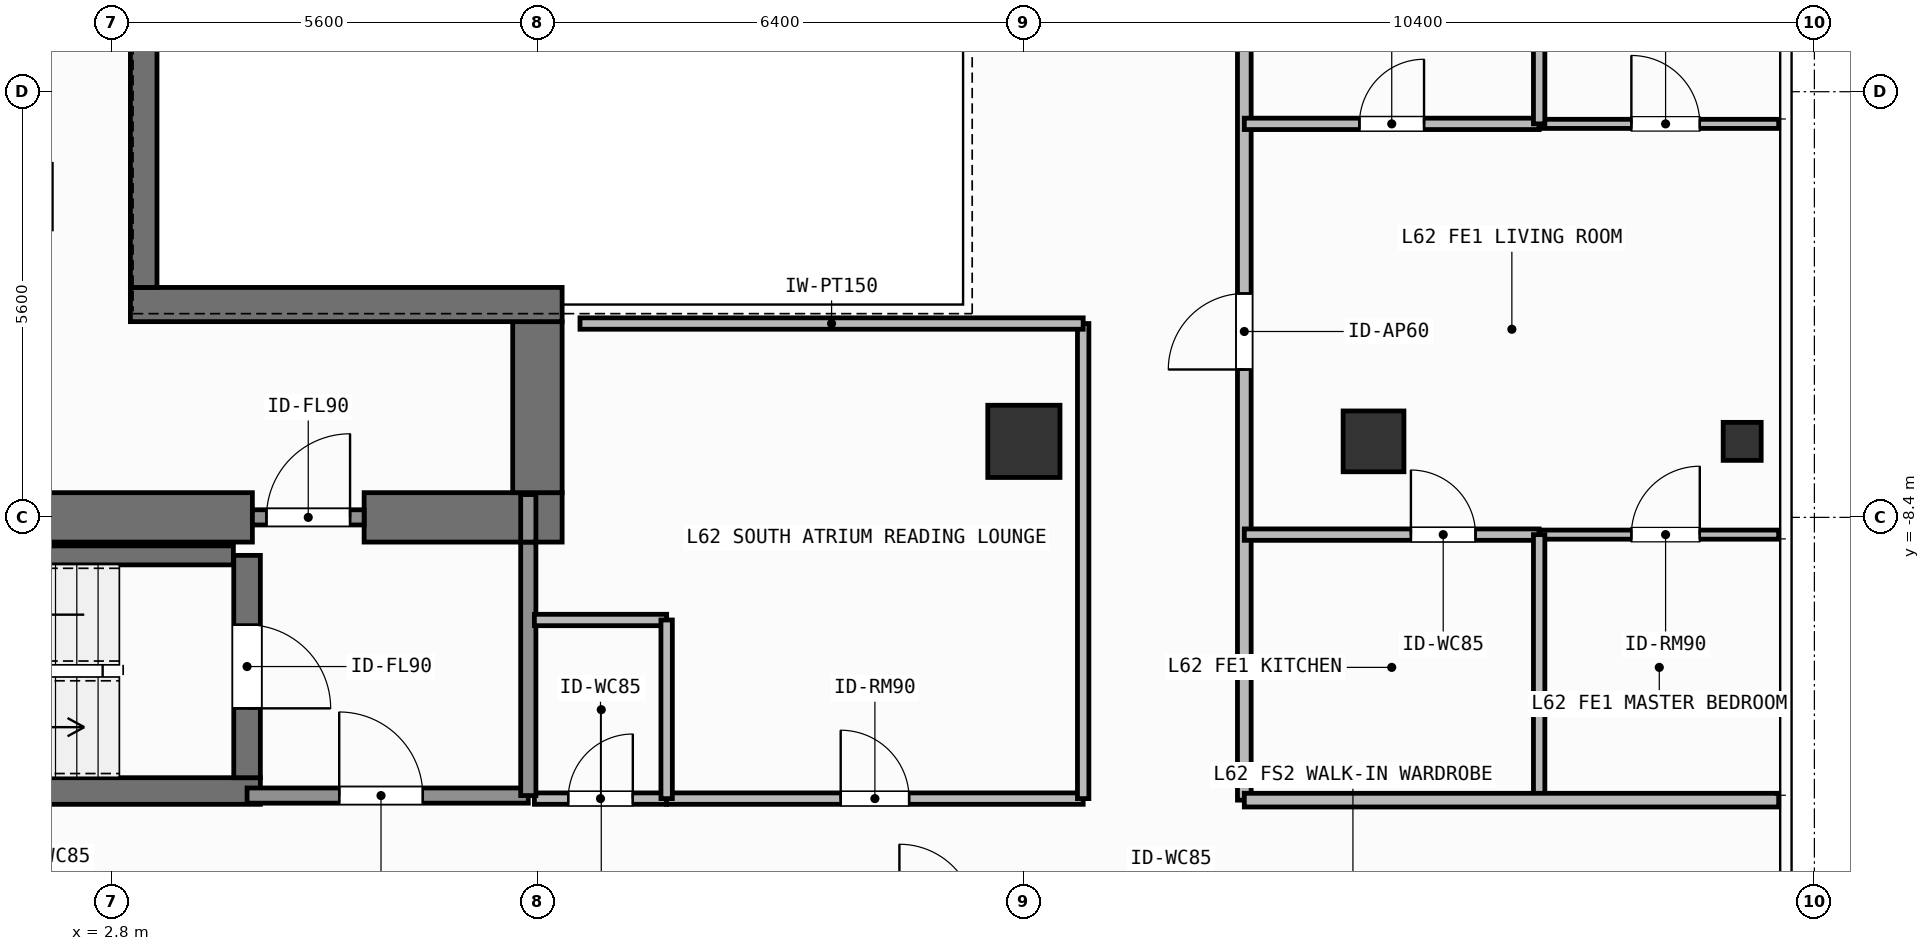
"""IFC4 building model, lengths in metres.
Left out: names, types, materials, properties, quantities, classifications, styles, units other than length and angle.
Written with IfcOpenShell. Run it as: python <this file> out.ifc"""

import sys

from ifc_helpers import new_model, si_unit, direction, frame, frame_2d, origin, origin_2d, place, context, subcontext, project, spatial, rectangle, hollow_rectangle, extrude, element, fill, save


model = new_model("IFC4")
c1 = context("Model", 3, precision=1e-05, world=origin(), true_north=direction((0.0, 1.0)))
c2 = subcontext(c1, "Body", "Model", "MODEL_VIEW")
j1 = project(units=[si_unit("LENGTHUNIT", "METRE"), si_unit("PLANEANGLEUNIT", "RADIAN")], contexts=[c1])
p1 = place(None, origin())
s1 = spatial("IfcSite", under=j1, at=p1, CompositionType="ELEMENT")
p2 = place(p1, origin())
s2 = spatial("IfcBuilding", under=s1, at=p2, CompositionType="ELEMENT")
p3 = place(p2, frame((0.0, 0.0, 254.7)))
s3 = spatial("IfcBuildingStorey", under=s2, at=p3, CompositionType="ELEMENT", Elevation=254.7)
p4 = place(p3, frame((-2.62, -8.4, 0.0), z_axis=(0.0, 0.0, 1.0), x_axis=(1.0, 0.0, 0.0)))
e1 = element("IfcWall", 1, at=p4, inside=s3, PredefinedType="SHEAR", context=c2, shape_type="SweptSolid", body=[
    extrude(rectangle(XDim=7.27, YDim=0.65, at=frame_2d((3.635, 0.0))), origin(), (0.0, 0.0, 1.0), 3.9),
])
p5 = place(p3, frame((6.12, -8.4, 0.0), z_axis=(0.0, 0.0, 1.0), x_axis=(1.0, 0.0, 0.0)))
e2 = element("IfcWall", 2, at=p5, inside=s3, PredefinedType="SHEAR", context=c2, shape_type="SweptSolid", body=[
    extrude(rectangle(XDim=2.605, YDim=0.65, at=frame_2d((1.302, 0.0))), origin(), (0.0, 0.0, 1.0), 3.9),
])
p6 = place(p3, frame((8.4, -8.075, 0.0), z_axis=(0.0, 0.0, 1.0), x_axis=(0.0, 1.0, 0.0)))
e3 = element("IfcWall", 3, at=p6, inside=s3, PredefinedType="SHEAR", context=c2, shape_type="SweptSolid", body=[
    extrude(rectangle(XDim=2.25, YDim=0.65, at=frame_2d((1.125, 0.0))), origin(), (0.0, 0.0, 1.0), 3.9),
])
p7 = place(p3, frame((3.045, -5.6, 0.0), z_axis=(0.0, 0.0, 1.0), x_axis=(1.0, 0.0, 0.0)))
e4 = element("IfcWall", 4, at=p7, inside=s3, PredefinedType="SHEAR", context=c2, shape_type="SweptSolid", body=[
    extrude(rectangle(XDim=5.68, YDim=0.45, at=frame_2d((2.84, 0.0))), origin(), (0.0, 0.0, 1.0), 3.9),
])
p8 = place(p3, frame((3.22, -5.375, 0.0), z_axis=(0.0, 0.0, 1.0), x_axis=(0.0, 1.0, 0.0)))
e5 = element("IfcWall", 5, at=p8, inside=s3, PredefinedType="SHEAR", context=c2, shape_type="SweptSolid", body=[
    extrude(rectangle(XDim=10.75, YDim=0.35, at=frame_2d((5.375, 0.0))), origin(), (0.0, 0.0, 1.0), 3.9),
])
p9 = place(p3, frame((-2.555, -12.0, 0.0), z_axis=(0.0, 0.0, 1.0), x_axis=(1.0, 0.0, 0.0)))
e6 = element("IfcWall", 6, at=p9, inside=s3, PredefinedType="SHEAR", context=c2, shape_type="SweptSolid", body=[
    extrude(rectangle(XDim=7.31, YDim=0.35, at=frame_2d((3.655, 0.0))), origin(), (0.0, 0.0, 1.0), 3.9),
])
p10 = place(p3, frame((-2.2, -8.9, 0.0), z_axis=(0.0, 0.0, 1.0), x_axis=(1.0, 0.0, 0.0)))
e7 = element("IfcWall", 7, at=p10, inside=s3, PredefinedType="SHEAR", context=c2, shape_type="SweptSolid", body=[
    extrude(rectangle(XDim=6.6, YDim=0.25, at=frame_2d((3.3, 0.0))), origin(), (0.0, 0.0, 1.0), 3.9),
])
p11 = place(p3, frame((4.58, -8.9, 0.0), z_axis=(0.0, 0.0, 1.0), x_axis=(0.0, -1.0, 0.0)))
e8 = element("IfcWall", 8, at=p11, inside=s3, PredefinedType="SHEAR", context=c2, shape_type="SweptSolid", body=[
    extrude(rectangle(XDim=2.925, YDim=0.35, at=frame_2d((1.462, 0.0))), origin(), (0.0, 0.0, 1.0), 3.9),
])
p12 = place(p11, frame((0.913, 0.0, 0.0)))
e9 = element("IfcOpeningElement", 9, at=p12, cuts=e8, PredefinedType="OPENING", context=c2, shape_type="SweptSolid", body=[
    extrude(rectangle(XDim=1.1, YDim=2.15, at=frame_2d((0.55, 1.075))), frame((0.0, 0.185, 0.0), z_axis=(0.0, -1.0, 0.0), x_axis=(1.0, 0.0, 0.0)), (0.0, 0.0, 1.0), 0.37),
])
p13 = place(p3, frame((14.8, -7.4, 0.0), z_axis=(0.0, 0.0, 1.0), x_axis=(1.0, 0.0, 0.0)))
e10 = element("IfcColumn", 10, at=p13, inside=s3, PredefinedType="COLUMN", context=c2, shape_type="SweptSolid", body=[
    extrude(rectangle(XDim=0.95, YDim=0.95, at=origin_2d()), origin(), (0.0, 0.0, 1.0), 3.9),
])
p14 = place(p3, frame((19.4, -7.4, 0.0), z_axis=(0.0, 0.0, 1.0), x_axis=(1.0, 0.0, 0.0)))
e11 = element("IfcColumn", 11, at=p14, inside=s3, PredefinedType="COLUMN", context=c2, shape_type="SweptSolid", body=[
    extrude(hollow_rectangle(XDim=0.8, YDim=0.8, WallThickness=0.036, at=origin_2d()), origin(), (0.0, 0.0, 1.0), 3.9),
])
p15 = place(p3, frame((24.25, -7.4, 0.0), z_axis=(0.0, 0.0, 1.0), x_axis=(1.0, 0.0, 0.0)))
e12 = element("IfcColumn", 12, at=p15, inside=s3, PredefinedType="COLUMN", context=c2, shape_type="SweptSolid", body=[
    extrude(hollow_rectangle(XDim=0.5, YDim=0.5, WallThickness=0.025, at=origin_2d()), origin(), (0.0, 0.0, 1.0), 3.9),
])
p16 = place(p3, frame((4.58, -12.06, 0.0), z_axis=(0.0, 0.0, 1.0), x_axis=(1.0, 0.0, 0.0)))
e13 = element("IfcWall", 13, at=p16, inside=s3, PredefinedType="SOLIDWALL", context=c2, shape_type="SweptSolid", body=[
    extrude(rectangle(XDim=3.7, YDim=0.2, at=frame_2d((1.85, 0.0))), origin(), (0.0, 0.0, 1.0), 3.68),
])
p17 = place(p16, frame((1.212, 0.0, 0.0)))
e14 = element("IfcOpeningElement", 14, at=p17, cuts=e13, PredefinedType="OPENING", context=c2, shape_type="SweptSolid", body=[
    extrude(rectangle(XDim=1.1, YDim=2.15, at=frame_2d((0.55, 1.075))), frame((0.0, 0.11, 0.0), z_axis=(0.0, -1.0, 0.0), x_axis=(1.0, 0.0, 0.0)), (0.0, 0.0, 1.0), 0.22),
])
p18 = place(p3, frame((4.65, -8.4, 0.0), z_axis=(0.0, 0.0, 1.0), x_axis=(1.0, 0.0, 0.0)))
e15 = element("IfcWall", 15, at=p18, inside=s3, PredefinedType="SOLIDWALL", context=c2, shape_type="SweptSolid", body=[
    extrude(rectangle(XDim=1.47, YDim=0.2, at=frame_2d((0.735, 0.0))), origin(), (0.0, 0.0, 1.0), 2.92),
])
p19 = place(p18, frame((0.185, 0.0, 0.0)))
e16 = element("IfcOpeningElement", 16, at=p19, cuts=e15, PredefinedType="OPENING", context=c2, shape_type="SweptSolid", body=[
    extrude(rectangle(XDim=1.1, YDim=2.15, at=frame_2d((0.55, 1.075))), frame((0.0, 0.11, 0.0), z_axis=(0.0, -1.0, 0.0), x_axis=(1.0, 0.0, 0.0)), (0.0, 0.0, 1.0), 0.22),
])
p20 = place(p3, frame((8.36, -12.1, 0.0), z_axis=(0.0, 0.0, 1.0), x_axis=(1.0, 0.0, 0.0)))
e17 = element("IfcWall", 17, at=p20, inside=s3, PredefinedType="PARTITIONING", context=c2, shape_type="SweptSolid", body=[
    extrude(rectangle(XDim=1.74, YDim=0.15, at=frame_2d((0.87, 0.0))), origin(), (0.0, 0.0, 1.0), 3.68),
])
p21 = place(p20, frame((0.445, 0.0, 0.0)))
e18 = element("IfcOpeningElement", 18, at=p21, cuts=e17, PredefinedType="OPENING", context=c2, shape_type="SweptSolid", body=[
    extrude(rectangle(XDim=0.85, YDim=2.1, at=frame_2d((0.425, 1.05))), frame((0.0, 0.085, 0.0), z_axis=(0.0, -1.0, 0.0), x_axis=(1.0, 0.0, 0.0)), (0.0, 0.0, 1.0), 0.17),
])
p22 = place(p3, frame((10.1, -12.1, 0.0), z_axis=(0.0, 0.0, 1.0), x_axis=(1.0, 0.0, 0.0)))
e19 = element("IfcWall", 19, at=p22, inside=s3, PredefinedType="PARTITIONING", context=c2, shape_type="SweptSolid", body=[
    extrude(rectangle(XDim=5.48, YDim=0.15, at=frame_2d((2.74, 0.0))), origin(), (0.0, 0.0, 1.0), 3.68),
])
p23 = place(p22, frame((2.29, 0.0, 0.0)))
e20 = element("IfcOpeningElement", 20, at=p23, cuts=e19, PredefinedType="OPENING", context=c2, shape_type="SweptSolid", body=[
    extrude(rectangle(XDim=0.9, YDim=2.1, at=frame_2d((0.45, 1.05))), frame((0.0, 0.085, 0.0), z_axis=(0.0, -1.0, 0.0), x_axis=(1.0, 0.0, 0.0)), (0.0, 0.0, 1.0), 0.17),
])
p24 = place(p3, frame((17.7, -12.12, 0.0), z_axis=(0.0, 0.0, 1.0), x_axis=(0.0, 1.0, 0.0)))
e21 = element("IfcWall", 21, at=p24, inside=s3, PredefinedType="PARTITIONING", context=c2, shape_type="SweptSolid", body=[
    extrude(rectangle(XDim=13.574, YDim=0.18, at=frame_2d((6.787, 0.0))), origin(), (0.0, 0.0, 1.0), 3.68),
])
p25 = place(p24, frame((5.665, 0.0, 0.0)))
e22 = element("IfcOpeningElement", 22, at=p25, cuts=e21, PredefinedType="OPENING", context=c2, shape_type="SweptSolid", body=[
    extrude(rectangle(XDim=1.0, YDim=2.2, at=frame_2d((0.5, 1.1))), frame((0.0, 0.1, 0.0), z_axis=(0.0, -1.0, 0.0), x_axis=(1.0, 0.0, 0.0)), (0.0, 0.0, 1.0), 0.2),
])
p26 = place(p3, frame((17.7, -3.223, 0.0), z_axis=(0.0, 0.0, 1.0), x_axis=(1.0, 0.0, 0.0)))
e23 = element("IfcWall", 23, at=p26, inside=s3, PredefinedType="PARTITIONING", context=c2, shape_type="SweptSolid", body=[
    extrude(rectangle(XDim=3.879, YDim=0.15, at=frame_2d((1.939, 0.0))), origin(), (0.0, 0.0, 1.0), 3.68),
])
p27 = place(p26, frame((1.514, 0.0, 0.0)))
e24 = element("IfcOpeningElement", 24, at=p27, cuts=e23, PredefinedType="OPENING", context=c2, shape_type="SweptSolid", body=[
    extrude(rectangle(XDim=0.85, YDim=2.1, at=frame_2d((0.425, 1.05))), frame((0.0, 0.085, 0.0), z_axis=(0.0, -1.0, 0.0), x_axis=(1.0, 0.0, 0.0)), (0.0, 0.0, 1.0), 0.17),
])
p28 = place(p3, frame((17.7, -8.627, 0.0), z_axis=(0.0, 0.0, 1.0), x_axis=(1.0, 0.0, 0.0)))
e25 = element("IfcWall", 25, at=p28, inside=s3, PredefinedType="PARTITIONING", context=c2, shape_type="SweptSolid", body=[
    extrude(rectangle(XDim=3.879, YDim=0.15, at=frame_2d((1.939, 0.0))), origin(), (0.0, 0.0, 1.0), 3.68),
])
p29 = place(p28, frame((2.192, 0.0, 0.0)))
e26 = element("IfcOpeningElement", 26, at=p29, cuts=e25, PredefinedType="OPENING", context=c2, shape_type="SweptSolid", body=[
    extrude(rectangle(XDim=0.85, YDim=2.1, at=frame_2d((0.425, 1.05))), frame((0.0, 0.085, 0.0), z_axis=(0.0, -1.0, 0.0), x_axis=(1.0, 0.0, 0.0)), (0.0, 0.0, 1.0), 0.17),
])
p30 = place(p3, frame((21.579, -8.627, 0.0), z_axis=(0.0, 0.0, 1.0), x_axis=(1.0, 0.0, 0.0)))
e27 = element("IfcWall", 27, at=p30, inside=s3, PredefinedType="PARTITIONING", context=c2, shape_type="SweptSolid", body=[
    extrude(rectangle(XDim=3.151, YDim=0.12, at=frame_2d((1.575, 0.0))), origin(), (0.0, 0.0, 1.0), 3.68),
])
p31 = place(p30, frame((1.213, 0.0, 0.0)))
e28 = element("IfcOpeningElement", 28, at=p31, cuts=e27, PredefinedType="OPENING", context=c2, shape_type="SweptSolid", body=[
    extrude(rectangle(XDim=0.9, YDim=2.1, at=frame_2d((0.45, 1.05))), frame((0.0, 0.07, 0.0), z_axis=(0.0, -1.0, 0.0), x_axis=(1.0, 0.0, 0.0)), (0.0, 0.0, 1.0), 0.14),
])
p32 = place(p3, frame((21.579, -3.223, 0.0), z_axis=(0.0, 0.0, 1.0), x_axis=(1.0, 0.0, 0.0)))
e29 = element("IfcWall", 29, at=p32, inside=s3, PredefinedType="PARTITIONING", context=c2, shape_type="SweptSolid", body=[
    extrude(rectangle(XDim=3.151, YDim=0.12, at=frame_2d((1.575, 0.0))), origin(), (0.0, 0.0, 1.0), 3.68),
])
p33 = place(p32, frame((1.213, 0.0, 0.0)))
e30 = element("IfcOpeningElement", 30, at=p33, cuts=e29, PredefinedType="OPENING", context=c2, shape_type="SweptSolid", body=[
    extrude(rectangle(XDim=0.9, YDim=2.1, at=frame_2d((0.45, 1.05))), frame((0.0, 0.07, 0.0), z_axis=(0.0, -1.0, 0.0), x_axis=(1.0, 0.0, 0.0)), (0.0, 0.0, 1.0), 0.14),
])
p34 = place(p3, frame((8.28, -12.06, 0.0), z_axis=(0.0, 0.0, 1.0), x_axis=(0.0, 1.0, 0.0)))
e31 = element("IfcWall", 31, at=p34, inside=s3, PredefinedType="SOLIDWALL", context=c2, shape_type="SweptSolid", body=[
    extrude(rectangle(XDim=3.335, YDim=0.2, at=frame_2d((1.667, 0.0))), origin(), (0.0, 0.0, 1.0), 3.68),
])
p35 = place(p3, frame((8.28, -8.725, 0.0), z_axis=(0.0, 0.0, 1.0), x_axis=(0.0, 1.0, 0.0)))
e32 = element("IfcWall", 32, at=p35, inside=s3, PredefinedType="SOLIDWALL", context=c2, shape_type="SweptSolid", body=[
    extrude(rectangle(XDim=0.625, YDim=0.2, at=frame_2d((0.312, 0.0))), origin(), (0.0, 0.0, 1.0), 3.68),
])
p36 = place(p3, frame((8.36, -9.75, 0.0), z_axis=(0.0, 0.0, 1.0), x_axis=(1.0, 0.0, 0.0)))
e33 = element("IfcWall", 33, at=p36, inside=s3, PredefinedType="PARTITIONING", context=c2, shape_type="SweptSolid", body=[
    extrude(rectangle(XDim=1.74, YDim=0.15, at=frame_2d((0.87, 0.0))), origin(), (0.0, 0.0, 1.0), 3.68),
])
p37 = place(p3, frame((10.1, -12.1, 0.0), z_axis=(0.0, 0.0, 1.0), x_axis=(0.0, 1.0, 0.0)))
e34 = element("IfcWall", 34, at=p37, inside=s3, PredefinedType="PARTITIONING", context=c2, shape_type="SweptSolid", body=[
    extrude(rectangle(XDim=2.35, YDim=0.15, at=frame_2d((1.175, 0.0))), origin(), (0.0, 0.0, 1.0), 3.68),
])
p38 = place(p3, frame((15.58, -12.1, 0.0), z_axis=(0.0, 0.0, 1.0), x_axis=(0.0, 1.0, 0.0)))
e35 = element("IfcWall", 35, at=p38, inside=s3, PredefinedType="PARTITIONING", context=c2, shape_type="SweptSolid", body=[
    extrude(rectangle(XDim=6.25, YDim=0.15, at=frame_2d((3.125, 0.0))), origin(), (0.0, 0.0, 1.0), 3.68),
])
p39 = place(p3, frame((8.96, -5.85, 0.0), z_axis=(0.0, 0.0, 1.0), x_axis=(1.0, 0.0, 0.0)))
e36 = element("IfcWall", 36, at=p39, inside=s3, PredefinedType="PARTITIONING", context=c2, shape_type="SweptSolid", body=[
    extrude(rectangle(XDim=6.62, YDim=0.15, at=frame_2d((3.31, 0.0))), origin(), (0.0, 0.0, 1.0), 3.68),
])
p40 = place(p3, frame((21.579, -12.12, 0.0), z_axis=(0.0, 0.0, 1.0), x_axis=(0.0, 1.0, 0.0)))
e37 = element("IfcWall", 37, at=p40, inside=s3, PredefinedType="PARTITIONING", context=c2, shape_type="SweptSolid", body=[
    extrude(rectangle(XDim=3.493, YDim=0.15, at=frame_2d((1.747, 0.0))), origin(), (0.0, 0.0, 1.0), 3.68),
])
p41 = place(p3, frame((21.579, -3.223, 0.0), z_axis=(0.0, 0.0, 1.0), x_axis=(0.0, 1.0, 0.0)))
e38 = element("IfcWall", 38, at=p41, inside=s3, PredefinedType="PARTITIONING", context=c2, shape_type="SweptSolid", body=[
    extrude(rectangle(XDim=4.677, YDim=0.15, at=frame_2d((2.338, 0.0))), origin(), (0.0, 0.0, 1.0), 3.68),
])
p42 = place(p3, frame((17.7, -12.12, 0.0), z_axis=(0.0, 0.0, 1.0), x_axis=(1.0, 0.0, 0.0)))
e39 = element("IfcWall", 39, at=p42, inside=s3, PredefinedType="PARTITIONING", context=c2, shape_type="SweptSolid", body=[
    extrude(rectangle(XDim=7.03, YDim=0.18, at=frame_2d((3.515, 0.0))), origin(), (0.0, 0.0, 1.0), 3.68),
])
p43 = place(p12, origin())
e40 = element("IfcDoor", 40, at=p43, inside=s3, OperationType="SINGLE_SWING_RIGHT", PredefinedType="DOOR", context=c2, shape_type="SweptSolid", body=[
    extrude(rectangle(XDim=1.1, YDim=2.15, at=frame_2d((0.55, 1.075))), frame((0.0, 0.025, 0.0), z_axis=(0.0, -1.0, 0.0), x_axis=(1.0, 0.0, 0.0)), (0.0, 0.0, 1.0), 0.05),
])
fill(e9, e40)
p44 = place(p17, origin())
e41 = element("IfcDoor", 41, at=p44, inside=s3, OperationType="SINGLE_SWING_LEFT", PredefinedType="DOOR", context=c2, shape_type="SweptSolid", body=[
    extrude(rectangle(XDim=1.1, YDim=2.15, at=frame_2d((0.55, 1.075))), frame((0.0, 0.025, 0.0), z_axis=(0.0, -1.0, 0.0), x_axis=(1.0, 0.0, 0.0)), (0.0, 0.0, 1.0), 0.05),
])
fill(e14, e41)
p45 = place(p19, origin())
e42 = element("IfcDoor", 42, at=p45, inside=s3, OperationType="SINGLE_SWING_RIGHT", PredefinedType="DOOR", context=c2, shape_type="SweptSolid", body=[
    extrude(rectangle(XDim=1.1, YDim=2.15, at=frame_2d((0.55, 1.075))), frame((0.0, 0.025, 0.0), z_axis=(0.0, -1.0, 0.0), x_axis=(1.0, 0.0, 0.0)), (0.0, 0.0, 1.0), 0.05),
])
fill(e16, e42)
p46 = place(p21, origin())
e43 = element("IfcDoor", 43, at=p46, inside=s3, OperationType="SINGLE_SWING_RIGHT", PredefinedType="DOOR", context=c2, shape_type="SweptSolid", body=[
    extrude(rectangle(XDim=0.85, YDim=2.1, at=frame_2d((0.425, 1.05))), frame((0.0, 0.025, 0.0), z_axis=(0.0, -1.0, 0.0), x_axis=(1.0, 0.0, 0.0)), (0.0, 0.0, 1.0), 0.05),
])
fill(e18, e43)
p47 = place(p23, origin())
e44 = element("IfcDoor", 44, at=p47, inside=s3, OperationType="SINGLE_SWING_LEFT", PredefinedType="DOOR", context=c2, shape_type="SweptSolid", body=[
    extrude(rectangle(XDim=0.9, YDim=2.1, at=frame_2d((0.45, 1.05))), frame((0.0, 0.025, 0.0), z_axis=(0.0, -1.0, 0.0), x_axis=(1.0, 0.0, 0.0)), (0.0, 0.0, 1.0), 0.05),
])
fill(e20, e44)
p48 = place(p25, origin())
e45 = element("IfcDoor", 45, at=p48, inside=s3, OperationType="SINGLE_SWING_LEFT", PredefinedType="DOOR", context=c2, shape_type="SweptSolid", body=[
    extrude(rectangle(XDim=1.0, YDim=2.2, at=frame_2d((0.5, 1.1))), frame((0.0, 0.025, 0.0), z_axis=(0.0, -1.0, 0.0), x_axis=(1.0, 0.0, 0.0)), (0.0, 0.0, 1.0), 0.05),
])
fill(e22, e45)
p49 = place(p27, origin())
e46 = element("IfcDoor", 46, at=p49, inside=s3, OperationType="SINGLE_SWING_RIGHT", PredefinedType="DOOR", context=c2, shape_type="SweptSolid", body=[
    extrude(rectangle(XDim=0.85, YDim=2.1, at=frame_2d((0.425, 1.05))), frame((0.0, 0.025, 0.0), z_axis=(0.0, -1.0, 0.0), x_axis=(1.0, 0.0, 0.0)), (0.0, 0.0, 1.0), 0.05),
])
fill(e24, e46)
p50 = place(p29, origin())
e47 = element("IfcDoor", 47, at=p50, inside=s3, OperationType="SINGLE_SWING_LEFT", PredefinedType="DOOR", context=c2, shape_type="SweptSolid", body=[
    extrude(rectangle(XDim=0.85, YDim=2.1, at=frame_2d((0.425, 1.05))), frame((0.0, 0.025, 0.0), z_axis=(0.0, -1.0, 0.0), x_axis=(1.0, 0.0, 0.0)), (0.0, 0.0, 1.0), 0.05),
])
fill(e26, e47)
p51 = place(p31, origin())
e48 = element("IfcDoor", 48, at=p51, inside=s3, OperationType="SINGLE_SWING_RIGHT", PredefinedType="DOOR", context=c2, shape_type="SweptSolid", body=[
    extrude(rectangle(XDim=0.9, YDim=2.1, at=frame_2d((0.45, 1.05))), frame((0.0, 0.025, 0.0), z_axis=(0.0, -1.0, 0.0), x_axis=(1.0, 0.0, 0.0)), (0.0, 0.0, 1.0), 0.05),
])
fill(e28, e48)
p52 = place(p33, origin())
e49 = element("IfcDoor", 49, at=p52, inside=s3, OperationType="SINGLE_SWING_LEFT", PredefinedType="DOOR", context=c2, shape_type="SweptSolid", body=[
    extrude(rectangle(XDim=0.9, YDim=2.1, at=frame_2d((0.45, 1.05))), frame((0.0, 0.025, 0.0), z_axis=(0.0, -1.0, 0.0), x_axis=(1.0, 0.0, 0.0)), (0.0, 0.0, 1.0), 0.05),
])
fill(e30, e49)
save(model, sys.argv[1])
